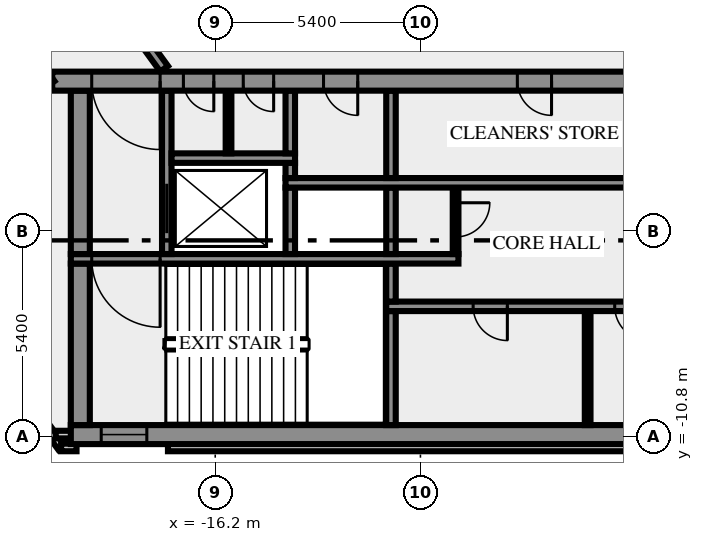
"""IFC4 building model, lengths in metres.
Left out: names, types, materials, properties, quantities, classifications, styles, units other than length and angle.
Written with IfcOpenShell. Run it as: python <this file> out.ifc"""

import sys

from ifc_helpers import new_model, si_unit, direction, frame, frame_2d, origin, place, context, subcontext, project, spatial, rectangle, extrude, element, fill, save


model = new_model("IFC4")
c1 = context("Model", 3, precision=1e-05, world=origin(), true_north=direction((0.0, 1.0)))
c2 = subcontext(c1, "Body", "Model", "MODEL_VIEW")
j1 = project(units=[si_unit("LENGTHUNIT", "METRE"), si_unit("PLANEANGLEUNIT", "RADIAN")], contexts=[c1])
p1 = place(None, origin())
s1 = spatial("IfcSite", under=j1, at=p1, CompositionType="ELEMENT")
p2 = place(p1, origin())
s2 = spatial("IfcBuilding", under=s1, at=p2, CompositionType="ELEMENT")
p3 = place(p2, frame((0.0, 0.0, 168.0)))
s3 = spatial("IfcBuildingStorey", under=s2, at=p3, CompositionType="ELEMENT", Elevation=168.0)
p4 = place(p3, frame((-21.833, -8.909, 0.0), z_axis=(0.0, 0.0, 1.0), x_axis=(0.587766567315, -0.809030569476, 0.0)))
e1 = element("IfcWall", 1, at=p4, inside=s3, PredefinedType="SOLIDWALL", context=c2, shape_type="SweptSolid", body=[
    extrude(rectangle(XDim=2.688, YDim=0.2, at=frame_2d((1.344, 0.0))), origin(), (0.0, 0.0, 1.0), 3.65),
])
p5 = place(p3, frame((-20.256, -11.088, 0.0), z_axis=(0.0, 0.0, 1.0), x_axis=(1.0, 0.0, 0.0)))
e2 = element("IfcWall", 2, at=p5, inside=s3, PredefinedType="SOLIDWALL", context=c2, shape_type="SweptSolid", body=[
    extrude(rectangle(XDim=0.406, YDim=0.2, at=frame_2d((0.203, 0.0))), origin(), (0.0, 0.0, 1.0), 3.65),
])
p6 = place(p3, frame((-17.444, -11.088, 0.0), z_axis=(0.0, 0.0, 1.0), x_axis=(1.0, 0.0, 0.0)))
e3 = element("IfcWall", 3, at=p6, inside=s3, PredefinedType="SOLIDWALL", context=c2, shape_type="SweptSolid", body=[
    extrude(rectangle(XDim=34.888, YDim=0.2, at=frame_2d((17.444, 0.0))), origin(), (0.0, 0.0, 1.0), 3.65),
])
p7 = place(p3, frame((-19.98, -10.75, 0.0), z_axis=(0.0, 0.0, 1.0), x_axis=(-1.0, 0.0, 0.0)))
e4 = element("IfcWall", 4, at=p7, inside=s3, PredefinedType="SOLIDWALL", context=c2, shape_type="SweptSolid", body=[
    extrude(rectangle(XDim=0.417, YDim=0.2, at=frame_2d((0.208, 0.0))), origin(), (0.0, 0.0, 1.0), 3.65),
])
p8 = place(p3, frame((-20.0, -10.75, 0.0), z_axis=(0.0, 0.0, 1.0), x_axis=(1.0, 0.0, 0.0)))
e5 = element("IfcWall", 5, at=p8, inside=s3, PredefinedType="SHEAR", context=c2, shape_type="SweptSolid", body=[
    extrude(rectangle(XDim=40.0, YDim=0.5, at=frame_2d((20.0, 0.0))), origin(), (0.0, 0.0, 1.0), 3.65),
])
p9 = place(p8, frame((0.8, 0.0, 1.0)))
e6 = element("IfcOpeningElement", 6, at=p9, cuts=e5, PredefinedType="OPENING", context=c2, shape_type="SweptSolid", body=[
    extrude(rectangle(XDim=1.2, YDim=1.2, at=frame_2d((0.6, 0.6))), frame((0.0, 0.26, 0.0), z_axis=(0.0, -1.0, 0.0), x_axis=(1.0, 0.0, 0.0)), (0.0, 0.0, 1.0), 0.52),
])
p10 = place(p8, frame((38.0, 0.0, 1.0)))
e7 = element("IfcOpeningElement", 7, at=p10, cuts=e5, PredefinedType="OPENING", context=c2, shape_type="SweptSolid", body=[
    extrude(rectangle(XDim=1.2, YDim=1.2, at=frame_2d((0.6, 0.6))), frame((0.0, 0.26, 0.0), z_axis=(0.0, -1.0, 0.0), x_axis=(1.0, 0.0, 0.0)), (0.0, 0.0, 1.0), 0.52),
])
p11 = place(p3, frame((-19.75, -10.5, 0.0), z_axis=(0.0, 0.0, 1.0), x_axis=(0.0, 1.0, 0.0)))
e8 = element("IfcWall", 8, at=p11, inside=s3, PredefinedType="SHEAR", context=c2, shape_type="SweptSolid", body=[
    extrude(rectangle(XDim=4.25, YDim=0.5, at=frame_2d((2.125, 0.0))), origin(), (0.0, 0.0, 1.0), 3.65),
])
p12 = place(p3, frame((-11.575, -10.5, 0.0), z_axis=(0.0, 0.0, 1.0), x_axis=(0.0, 1.0, 0.0)))
e9 = element("IfcWall", 9, at=p12, inside=s3, PredefinedType="SHEAR", context=c2, shape_type="SweptSolid", body=[
    extrude(rectangle(XDim=3.0, YDim=0.25, at=frame_2d((1.5, 0.0))), origin(), (0.0, 0.0, 1.0), 3.65),
])
p13 = place(p3, frame((-6.4, -10.5, 0.0), z_axis=(0.0, 0.0, 1.0), x_axis=(0.0, 1.0, 0.0)))
e10 = element("IfcWall", 10, at=p13, inside=s3, PredefinedType="PARTITIONING", context=c2, shape_type="SweptSolid", body=[
    extrude(rectangle(XDim=3.0, YDim=0.15, at=frame_2d((1.5, 0.0))), origin(), (0.0, 0.0, 1.0), 3.65),
])
p14 = place(p3, frame((11.7, -7.375, 0.0), z_axis=(0.0, 0.0, 1.0), x_axis=(-1.0, 0.0, 0.0)))
e11 = element("IfcWall", 11, at=p14, inside=s3, PredefinedType="SHEAR", context=c2, shape_type="SweptSolid", body=[
    extrude(rectangle(XDim=23.4, YDim=0.25, at=frame_2d((11.7, 0.0))), origin(), (0.0, 0.0, 1.0), 3.65),
])
p15 = place(p14, frame((20.213, 0.0, 0.0)))
e12 = element("IfcOpeningElement", 12, at=p15, cuts=e11, PredefinedType="OPENING", context=c2, shape_type="SweptSolid", body=[
    extrude(rectangle(XDim=0.9, YDim=2.1, at=frame_2d((0.45, 1.05))), frame((0.0, 0.135, 0.0), z_axis=(0.0, -1.0, 0.0), x_axis=(1.0, 0.0, 0.0)), (0.0, 0.0, 1.0), 0.27),
])
p16 = place(p14, frame((16.488, 0.0, 0.0)))
e13 = element("IfcOpeningElement", 13, at=p16, cuts=e11, PredefinedType="OPENING", context=c2, shape_type="SweptSolid", body=[
    extrude(rectangle(XDim=0.9, YDim=2.1, at=frame_2d((0.45, 1.05))), frame((0.0, 0.135, 0.0), z_axis=(0.0, -1.0, 0.0), x_axis=(1.0, 0.0, 0.0)), (0.0, 0.0, 1.0), 0.27),
])
p17 = place(p14, frame((14.45, 0.0, 0.0)))
e14 = element("IfcOpeningElement", 14, at=p17, cuts=e11, PredefinedType="OPENING", context=c2, shape_type="SweptSolid", body=[
    extrude(rectangle(XDim=0.9, YDim=2.1, at=frame_2d((0.45, 1.05))), frame((0.0, 0.135, 0.0), z_axis=(0.0, -1.0, 0.0), x_axis=(1.0, 0.0, 0.0)), (0.0, 0.0, 1.0), 0.27),
])
p18 = place(p14, frame((12.95, 0.0, 0.0)))
e15 = element("IfcOpeningElement", 15, at=p18, cuts=e11, PredefinedType="OPENING", context=c2, shape_type="SweptSolid", body=[
    extrude(rectangle(XDim=0.9, YDim=2.1, at=frame_2d((0.45, 1.05))), frame((0.0, 0.135, 0.0), z_axis=(0.0, -1.0, 0.0), x_axis=(1.0, 0.0, 0.0)), (0.0, 0.0, 1.0), 0.27),
])
p19 = place(p14, frame((11.475, 0.0, 0.0)))
e16 = element("IfcOpeningElement", 16, at=p19, cuts=e11, PredefinedType="OPENING", context=c2, shape_type="SweptSolid", body=[
    extrude(rectangle(XDim=0.9, YDim=2.1, at=frame_2d((0.45, 1.05))), frame((0.0, 0.135, 0.0), z_axis=(0.0, -1.0, 0.0), x_axis=(1.0, 0.0, 0.0)), (0.0, 0.0, 1.0), 0.27),
])
p20 = place(p14, frame((10.45, 0.0, 0.0)))
e17 = element("IfcOpeningElement", 17, at=p20, cuts=e11, PredefinedType="OPENING", context=c2, shape_type="SweptSolid", body=[
    extrude(rectangle(XDim=0.5, YDim=2.1, at=frame_2d((0.25, 1.05))), frame((0.0, 0.135, 0.0), z_axis=(0.0, -1.0, 0.0), x_axis=(1.0, 0.0, 0.0)), (0.0, 0.0, 1.0), 0.27),
])
p21 = place(p14, frame((8.35, 0.0, 0.0)))
e18 = element("IfcOpeningElement", 18, at=p21, cuts=e11, PredefinedType="OPENING", context=c2, shape_type="SweptSolid", body=[
    extrude(rectangle(XDim=1.1, YDim=2.1, at=frame_2d((0.55, 1.05))), frame((0.0, 0.135, 0.0), z_axis=(0.0, -1.0, 0.0), x_axis=(1.0, 0.0, 0.0)), (0.0, 0.0, 1.0), 0.27),
])
p22 = place(p14, frame((5.85, 0.0, 0.0)))
e19 = element("IfcOpeningElement", 19, at=p22, cuts=e11, PredefinedType="OPENING", context=c2, shape_type="SweptSolid", body=[
    extrude(rectangle(XDim=1.1, YDim=2.1, at=frame_2d((0.55, 1.05))), frame((0.0, 0.135, 0.0), z_axis=(0.0, -1.0, 0.0), x_axis=(1.0, 0.0, 0.0)), (0.0, 0.0, 1.0), 0.27),
])
p23 = place(p14, frame((3.35, 0.0, 0.0)))
e20 = element("IfcOpeningElement", 20, at=p23, cuts=e11, PredefinedType="OPENING", context=c2, shape_type="SweptSolid", body=[
    extrude(rectangle(XDim=1.1, YDim=2.1, at=frame_2d((0.55, 1.05))), frame((0.0, 0.135, 0.0), z_axis=(0.0, -1.0, 0.0), x_axis=(1.0, 0.0, 0.0)), (0.0, 0.0, 1.0), 0.27),
])
p24 = place(p14, frame((0.85, 0.0, 0.0)))
e21 = element("IfcOpeningElement", 21, at=p24, cuts=e11, PredefinedType="OPENING", context=c2, shape_type="SweptSolid", body=[
    extrude(rectangle(XDim=1.1, YDim=2.1, at=frame_2d((0.55, 1.05))), frame((0.0, 0.135, 0.0), z_axis=(0.0, -1.0, 0.0), x_axis=(1.0, 0.0, 0.0)), (0.0, 0.0, 1.0), 0.27),
])
p25 = place(p3, frame((-11.575, -7.25, 0.0), z_axis=(0.0, 0.0, 1.0), x_axis=(0.0, 1.0, 0.0)))
e22 = element("IfcWall", 22, at=p25, inside=s3, PredefinedType="SHEAR", context=c2, shape_type="SweptSolid", body=[
    extrude(rectangle(XDim=1.0, YDim=0.25, at=frame_2d((0.5, 0.0))), origin(), (0.0, 0.0, 1.0), 3.65),
])
p26 = place(p3, frame((-9.8, -6.125, 0.0), z_axis=(0.0, 0.0, 1.0), x_axis=(-1.0, 0.0, 0.0)))
e23 = element("IfcWall", 23, at=p26, inside=s3, PredefinedType="SHEAR", context=c2, shape_type="SweptSolid", body=[
    extrude(rectangle(XDim=10.2, YDim=0.25, at=frame_2d((5.1, 0.0))), origin(), (0.0, 0.0, 1.0), 3.65),
])
p27 = place(p26, frame((7.85, 0.0, 0.0)))
e24 = element("IfcOpeningElement", 24, at=p27, cuts=e23, PredefinedType="OPENING", context=c2, shape_type="SweptSolid", body=[
    extrude(rectangle(XDim=1.8, YDim=2.1, at=frame_2d((0.9, 1.05))), frame((0.0, 0.135, 0.0), z_axis=(0.0, -1.0, 0.0), x_axis=(1.0, 0.0, 0.0)), (0.0, 0.0, 1.0), 0.27),
])
p28 = place(p3, frame((-19.75, -6.0, 0.0), z_axis=(0.0, 0.0, 1.0), x_axis=(0.0, 1.0, 0.0)))
e25 = element("IfcWall", 25, at=p28, inside=s3, PredefinedType="SHEAR", context=c2, shape_type="SweptSolid", body=[
    extrude(rectangle(XDim=4.3, YDim=0.5, at=frame_2d((2.15, 0.0))), origin(), (0.0, 0.0, 1.0), 3.65),
])
p29 = place(p3, frame((-17.475, -6.0, 0.0), z_axis=(0.0, 0.0, 1.0), x_axis=(0.0, 1.0, 0.0)))
e26 = element("IfcWall", 26, at=p29, inside=s3, PredefinedType="SHEAR", context=c2, shape_type="SweptSolid", body=[
    extrude(rectangle(XDim=4.3, YDim=0.25, at=frame_2d((2.15, 0.0))), origin(), (0.0, 0.0, 1.0), 3.65),
])
p30 = place(p29, frame((0.55, 0.0, 0.0)))
e27 = element("IfcOpeningElement", 27, at=p30, cuts=e26, PredefinedType="OPENING", context=c2, shape_type="SweptSolid", body=[
    extrude(rectangle(XDim=1.3, YDim=2.1, at=frame_2d((0.65, 1.05))), frame((0.0, 0.135, 0.0), z_axis=(0.0, -1.0, 0.0), x_axis=(1.0, 0.0, 0.0)), (0.0, 0.0, 1.0), 0.27),
])
for number, where, z_axis, x_axis in (
    (28, (-14.225, -6.0, 0.0), (0.0, 0.0, 1.0), (0.0, 1.0, 0.0)),
    (29, (-11.575, -6.0, 0.0), (0.0, 0.0, 1.0), (0.0, 1.0, 0.0)),
):
    element("IfcWall", number, at=place(p3, frame(where, z_axis=z_axis, x_axis=x_axis)), inside=s3, PredefinedType="SHEAR", context=c2, shape_type="SweptSolid", body=[
        extrude(rectangle(XDim=1.75, YDim=0.25, at=frame_2d((0.875, 0.0))), origin(), (0.0, 0.0, 1.0), 3.65),
    ])
p31 = place(p3, frame((-9.875, -4.25, 0.0), z_axis=(0.0, 0.0, 1.0), x_axis=(0.0, -1.0, 0.0)))
e30 = element("IfcWall", 30, at=p31, inside=s3, PredefinedType="PARTITIONING", context=c2, shape_type="SweptSolid", body=[
    extrude(rectangle(XDim=1.75, YDim=0.15, at=frame_2d((0.875, 0.0))), origin(), (0.0, 0.0, 1.0), 3.65),
])
p32 = place(p31, frame((0.4, 0.0, 0.0)))
e31 = element("IfcOpeningElement", 31, at=p32, cuts=e30, PredefinedType="OPENING", context=c2, shape_type="SweptSolid", body=[
    extrude(rectangle(XDim=0.9, YDim=2.1, at=frame_2d((0.45, 1.05))), frame((0.0, 0.085, 0.0), z_axis=(0.0, -1.0, 0.0), x_axis=(1.0, 0.0, 0.0)), (0.0, 0.0, 1.0), 0.17),
])
p33 = place(p3, frame((-14.35, -4.125, 0.0), z_axis=(0.0, 0.0, 1.0), x_axis=(1.0, 0.0, 0.0)))
e32 = element("IfcWall", 32, at=p33, inside=s3, PredefinedType="SHEAR", context=c2, shape_type="SweptSolid", body=[
    extrude(rectangle(XDim=10.4, YDim=0.25, at=frame_2d((5.2, 0.0))), origin(), (0.0, 0.0, 1.0), 3.65),
])
p34 = place(p3, frame((-14.225, -4.0, 0.0), z_axis=(0.0, 0.0, 1.0), x_axis=(0.0, 1.0, 0.0)))
e33 = element("IfcWall", 33, at=p34, inside=s3, PredefinedType="SHEAR", context=c2, shape_type="SweptSolid", body=[
    extrude(rectangle(XDim=0.4, YDim=0.25, at=frame_2d((0.2, 0.0))), origin(), (0.0, 0.0, 1.0), 3.65),
])
p35 = place(p3, frame((-11.575, -4.0, 0.0), z_axis=(0.0, 0.0, 1.0), x_axis=(0.0, 1.0, 0.0)))
e34 = element("IfcWall", 34, at=p35, inside=s3, PredefinedType="SHEAR", context=c2, shape_type="SweptSolid", body=[
    extrude(rectangle(XDim=2.3, YDim=0.25, at=frame_2d((1.15, 0.0))), origin(), (0.0, 0.0, 1.0), 3.65),
])
p36 = place(p3, frame((-17.35, -3.475, 0.0), z_axis=(0.0, 0.0, 1.0), x_axis=(1.0, 0.0, 0.0)))
e35 = element("IfcWall", 35, at=p36, inside=s3, PredefinedType="SHEAR", context=c2, shape_type="SweptSolid", body=[
    extrude(rectangle(XDim=3.25, YDim=0.25, at=frame_2d((1.625, 0.0))), origin(), (0.0, 0.0, 1.0), 3.65),
])
p37 = place(p3, frame((-15.85, -3.35, 0.0), z_axis=(0.0, 0.0, 1.0), x_axis=(0.0, 1.0, 0.0)))
e36 = element("IfcWall", 36, at=p37, inside=s3, PredefinedType="PARTITIONING", context=c2, shape_type="SweptSolid", body=[
    extrude(rectangle(XDim=1.65, YDim=0.15, at=frame_2d((0.825, 0.0))), origin(), (0.0, 0.0, 1.0), 3.65),
])
p38 = place(p3, frame((-14.225, -3.35, 0.0), z_axis=(0.0, 0.0, 1.0), x_axis=(0.0, 1.0, 0.0)))
e37 = element("IfcWall", 37, at=p38, inside=s3, PredefinedType="SHEAR", context=c2, shape_type="SweptSolid", body=[
    extrude(rectangle(XDim=1.65, YDim=0.25, at=frame_2d((0.825, 0.0))), origin(), (0.0, 0.0, 1.0), 3.65),
])
p39 = place(p3, frame((20.49, -1.45, 0.0), z_axis=(0.0, 0.0, 1.0), x_axis=(-1.0, 0.0, 0.0)))
e38 = element("IfcWall", 38, at=p39, inside=s3, PredefinedType="SHEAR", context=c2, shape_type="SweptSolid", body=[
    extrude(rectangle(XDim=40.98, YDim=0.5, at=frame_2d((20.49, 0.0))), origin(), (0.0, 0.0, 1.0), 3.65),
])
p40 = place(p39, frame((38.14, 0.0, 0.0)))
e39 = element("IfcOpeningElement", 39, at=p40, cuts=e38, PredefinedType="OPENING", context=c2, shape_type="SweptSolid", body=[
    extrude(rectangle(XDim=1.8, YDim=2.1, at=frame_2d((0.9, 1.05))), frame((0.0, 0.26, 0.0), z_axis=(0.0, -1.0, 0.0), x_axis=(1.0, 0.0, 0.0)), (0.0, 0.0, 1.0), 0.52),
])
p41 = place(p39, frame((36.728, 0.0, 0.0)))
e40 = element("IfcOpeningElement", 40, at=p41, cuts=e38, PredefinedType="OPENING", context=c2, shape_type="SweptSolid", body=[
    extrude(rectangle(XDim=0.8, YDim=2.1, at=frame_2d((0.4, 1.05))), frame((0.0, 0.26, 0.0), z_axis=(0.0, -1.0, 0.0), x_axis=(1.0, 0.0, 0.0)), (0.0, 0.0, 1.0), 0.52),
])
p42 = place(p39, frame((35.153, 0.0, 0.0)))
e41 = element("IfcOpeningElement", 41, at=p42, cuts=e38, PredefinedType="OPENING", context=c2, shape_type="SweptSolid", body=[
    extrude(rectangle(XDim=0.8, YDim=2.1, at=frame_2d((0.4, 1.05))), frame((0.0, 0.26, 0.0), z_axis=(0.0, -1.0, 0.0), x_axis=(1.0, 0.0, 0.0)), (0.0, 0.0, 1.0), 0.52),
])
p43 = place(p39, frame((32.94, 0.0, 0.0)))
e42 = element("IfcOpeningElement", 42, at=p43, cuts=e38, PredefinedType="OPENING", context=c2, shape_type="SweptSolid", body=[
    extrude(rectangle(XDim=0.9, YDim=2.1, at=frame_2d((0.45, 1.05))), frame((0.0, 0.26, 0.0), z_axis=(0.0, -1.0, 0.0), x_axis=(1.0, 0.0, 0.0)), (0.0, 0.0, 1.0), 0.52),
])
p44 = place(p39, frame((27.84, 0.0, 0.0)))
e43 = element("IfcOpeningElement", 43, at=p44, cuts=e38, PredefinedType="OPENING", context=c2, shape_type="SweptSolid", body=[
    extrude(rectangle(XDim=0.9, YDim=2.1, at=frame_2d((0.45, 1.05))), frame((0.0, 0.26, 0.0), z_axis=(0.0, -1.0, 0.0), x_axis=(1.0, 0.0, 0.0)), (0.0, 0.0, 1.0), 0.52),
])
p45 = place(p39, frame((21.765, 0.0, 0.0)))
e44 = element("IfcOpeningElement", 44, at=p45, cuts=e38, PredefinedType="OPENING", context=c2, shape_type="SweptSolid", body=[
    extrude(rectangle(XDim=2.0, YDim=2.1, at=frame_2d((1.0, 1.05))), frame((0.0, 0.26, 0.0), z_axis=(0.0, -1.0, 0.0), x_axis=(1.0, 0.0, 0.0)), (0.0, 0.0, 1.0), 0.52),
])
p46 = place(p39, frame((7.14, 0.0, 0.0)))
e45 = element("IfcOpeningElement", 45, at=p46, cuts=e38, PredefinedType="OPENING", context=c2, shape_type="SweptSolid", body=[
    extrude(rectangle(XDim=0.9, YDim=2.1, at=frame_2d((0.45, 1.05))), frame((0.0, 0.26, 0.0), z_axis=(0.0, -1.0, 0.0), x_axis=(1.0, 0.0, 0.0)), (0.0, 0.0, 1.0), 0.52),
])
p47 = place(p39, frame((4.19, 0.0, 0.0)))
e46 = element("IfcOpeningElement", 46, at=p47, cuts=e38, PredefinedType="OPENING", context=c2, shape_type="SweptSolid", body=[
    extrude(rectangle(XDim=0.9, YDim=2.1, at=frame_2d((0.45, 1.05))), frame((0.0, 0.26, 0.0), z_axis=(0.0, -1.0, 0.0), x_axis=(1.0, 0.0, 0.0)), (0.0, 0.0, 1.0), 0.52),
])
p48 = place(p39, frame((1.04, 0.0, 0.0)))
e47 = element("IfcOpeningElement", 47, at=p48, cuts=e38, PredefinedType="OPENING", context=c2, shape_type="SweptSolid", body=[
    extrude(rectangle(XDim=1.8, YDim=2.1, at=frame_2d((0.9, 1.05))), frame((0.0, 0.26, 0.0), z_axis=(0.0, -1.0, 0.0), x_axis=(1.0, 0.0, 0.0)), (0.0, 0.0, 1.0), 0.52),
])
p49 = place(p3, frame((-20.531, -1.523, 0.0), z_axis=(0.0, 0.0, 1.0), x_axis=(-0.587784239999, 0.809017729849, 0.0)))
e48 = element("IfcWall", 48, at=p49, inside=s3, PredefinedType="SOLIDWALL", context=c2, shape_type="SweptSolid", body=[
    extrude(rectangle(XDim=23.271, YDim=0.25, at=frame_2d((11.635, 0.0))), origin(), (0.0, 0.0, 1.0), 3.65),
])
p50 = place(p49, frame((18.366, 0.0, 0.0)))
e49 = element("IfcOpeningElement", 49, at=p50, cuts=e48, PredefinedType="OPENING", context=c2, shape_type="SweptSolid", body=[
    extrude(rectangle(XDim=0.9, YDim=2.1, at=frame_2d((0.45, 1.05))), frame((0.0, 0.135, 0.0), z_axis=(0.0, -1.0, 0.0), x_axis=(1.0, 0.0, 0.0)), (0.0, 0.0, 1.0), 0.27),
])
p51 = place(p49, frame((10.266, 0.0, 0.0)))
e50 = element("IfcOpeningElement", 50, at=p51, cuts=e48, PredefinedType="OPENING", context=c2, shape_type="SweptSolid", body=[
    extrude(rectangle(XDim=0.9, YDim=2.1, at=frame_2d((0.45, 1.05))), frame((0.0, 0.135, 0.0), z_axis=(0.0, -1.0, 0.0), x_axis=(1.0, 0.0, 0.0)), (0.0, 0.0, 1.0), 0.27),
])
p52 = place(p49, frame((21.896, 0.0, 0.0)))
e51 = element("IfcOpeningElement", 51, at=p52, cuts=e48, PredefinedType="OPENING", context=c2, shape_type="SweptSolid", body=[
    extrude(rectangle(XDim=0.9, YDim=2.1, at=frame_2d((0.45, 1.05))), frame((0.0, 0.135, 0.0), z_axis=(0.0, -1.0, 0.0), x_axis=(1.0, 0.0, 0.0)), (0.0, 0.0, 1.0), 0.27),
])
p53 = place(p49, frame((12.966, 0.0, 0.0)))
e52 = element("IfcOpeningElement", 52, at=p53, cuts=e48, PredefinedType="OPENING", context=c2, shape_type="SweptSolid", body=[
    extrude(rectangle(XDim=0.9, YDim=2.1, at=frame_2d((0.45, 1.05))), frame((0.0, 0.135, 0.0), z_axis=(0.0, -1.0, 0.0), x_axis=(1.0, 0.0, 0.0)), (0.0, 0.0, 1.0), 0.27),
])
p54 = place(p3, frame((-31.918, 18.658, 0.0), z_axis=(0.0, 0.0, 1.0), x_axis=(0.587788731405, -0.80901446664, 0.0)))
e53 = element("IfcWall", 53, at=p54, inside=s3, PredefinedType="SOLIDWALL", context=c2, shape_type="SweptSolid", body=[
    extrude(rectangle(XDim=24.453, YDim=0.25, at=frame_2d((12.227, 0.0))), origin(), (0.0, 0.0, 1.0), 3.65),
])
p55 = place(p54, frame((0.224, 0.0, 0.0)))
e54 = element("IfcOpeningElement", 54, at=p55, cuts=e53, PredefinedType="OPENING", context=c2, shape_type="SweptSolid", body=[
    extrude(rectangle(XDim=0.9, YDim=2.1, at=frame_2d((0.45, 1.05))), frame((0.0, 0.135, 0.0), z_axis=(0.0, -1.0, 0.0), x_axis=(1.0, 0.0, 0.0)), (0.0, 0.0, 1.0), 0.27),
])
p56 = place(p9, origin())
e55 = element("IfcWindow", 55, at=p56, inside=s3, PartitioningType="SINGLE_PANEL", PredefinedType="WINDOW", context=c2, shape_type="SweptSolid", body=[
    extrude(rectangle(XDim=1.2, YDim=1.2, at=frame_2d((0.6, 0.6))), frame((0.0, 0.03, 0.0), z_axis=(0.0, -1.0, 0.0), x_axis=(1.0, 0.0, 0.0)), (0.0, 0.0, 1.0), 0.06),
])
fill(e6, e55)
p57 = place(p15, origin())
e56 = element("IfcDoor", 56, at=p57, inside=s3, OperationType="SINGLE_SWING_RIGHT", PredefinedType="DOOR", context=c2, shape_type="SweptSolid", body=[
    extrude(rectangle(XDim=0.9, YDim=2.1, at=frame_2d((0.45, 1.05))), frame((0.0, 0.025, 0.0), z_axis=(0.0, -1.0, 0.0), x_axis=(1.0, 0.0, 0.0)), (0.0, 0.0, 1.0), 0.05),
])
fill(e12, e56)
p58 = place(p16, origin())
e57 = element("IfcDoor", 57, at=p58, inside=s3, OperationType="SINGLE_SWING_RIGHT", PredefinedType="DOOR", context=c2, shape_type="SweptSolid", body=[
    extrude(rectangle(XDim=0.9, YDim=2.1, at=frame_2d((0.45, 1.05))), frame((0.0, 0.025, 0.0), z_axis=(0.0, -1.0, 0.0), x_axis=(1.0, 0.0, 0.0)), (0.0, 0.0, 1.0), 0.05),
])
fill(e13, e57)
p59 = place(p27, origin())
e58 = element("IfcDoor", 58, at=p59, inside=s3, OperationType="DOUBLE_DOOR_SINGLE_SWING", PredefinedType="DOOR", context=c2, shape_type="SweptSolid", body=[
    extrude(rectangle(XDim=1.8, YDim=2.1, at=frame_2d((0.9, 1.05))), frame((0.0, 0.025, 0.0), z_axis=(0.0, -1.0, 0.0), x_axis=(1.0, 0.0, 0.0)), (0.0, 0.0, 1.0), 0.05),
])
fill(e24, e58)
p60 = place(p30, origin())
e59 = element("IfcDoor", 59, at=p60, inside=s3, OperationType="DOUBLE_DOOR_SLIDING", PredefinedType="DOOR", context=c2, shape_type="SweptSolid", body=[
    extrude(rectangle(XDim=1.3, YDim=2.1, at=frame_2d((0.65, 1.05))), frame((0.0, 0.025, 0.0), z_axis=(0.0, -1.0, 0.0), x_axis=(1.0, 0.0, 0.0)), (0.0, 0.0, 1.0), 0.05),
])
fill(e27, e59)
p61 = place(p32, origin())
e60 = element("IfcDoor", 60, at=p61, inside=s3, OperationType="SINGLE_SWING_LEFT", PredefinedType="DOOR", context=c2, shape_type="SweptSolid", body=[
    extrude(rectangle(XDim=0.9, YDim=2.1, at=frame_2d((0.45, 1.05))), frame((0.0, 0.025, 0.0), z_axis=(0.0, -1.0, 0.0), x_axis=(1.0, 0.0, 0.0)), (0.0, 0.0, 1.0), 0.05),
])
fill(e31, e60)
p62 = place(p40, origin())
e61 = element("IfcDoor", 61, at=p62, inside=s3, OperationType="DOUBLE_DOOR_SINGLE_SWING", PredefinedType="DOOR", context=c2, shape_type="SweptSolid", body=[
    extrude(rectangle(XDim=1.8, YDim=2.1, at=frame_2d((0.9, 1.05))), frame((0.0, 0.025, 0.0), z_axis=(0.0, -1.0, 0.0), x_axis=(1.0, 0.0, 0.0)), (0.0, 0.0, 1.0), 0.05),
])
fill(e39, e61)
p63 = place(p41, origin())
e62 = element("IfcDoor", 62, at=p63, inside=s3, OperationType="SINGLE_SWING_RIGHT", PredefinedType="DOOR", context=c2, shape_type="SweptSolid", body=[
    extrude(rectangle(XDim=0.8, YDim=2.1, at=frame_2d((0.4, 1.05))), frame((0.0, 0.025, 0.0), z_axis=(0.0, -1.0, 0.0), x_axis=(1.0, 0.0, 0.0)), (0.0, 0.0, 1.0), 0.05),
])
fill(e40, e62)
p64 = place(p42, origin())
e63 = element("IfcDoor", 63, at=p64, inside=s3, OperationType="SINGLE_SWING_RIGHT", PredefinedType="DOOR", context=c2, shape_type="SweptSolid", body=[
    extrude(rectangle(XDim=0.8, YDim=2.1, at=frame_2d((0.4, 1.05))), frame((0.0, 0.025, 0.0), z_axis=(0.0, -1.0, 0.0), x_axis=(1.0, 0.0, 0.0)), (0.0, 0.0, 1.0), 0.05),
])
fill(e41, e63)
p65 = place(p43, origin())
e64 = element("IfcDoor", 64, at=p65, inside=s3, OperationType="SINGLE_SWING_RIGHT", PredefinedType="DOOR", context=c2, shape_type="SweptSolid", body=[
    extrude(rectangle(XDim=0.9, YDim=2.1, at=frame_2d((0.45, 1.05))), frame((0.0, 0.025, 0.0), z_axis=(0.0, -1.0, 0.0), x_axis=(1.0, 0.0, 0.0)), (0.0, 0.0, 1.0), 0.05),
])
fill(e42, e64)
p66 = place(p44, origin())
e65 = element("IfcDoor", 65, at=p66, inside=s3, OperationType="SINGLE_SWING_RIGHT", PredefinedType="DOOR", context=c2, shape_type="SweptSolid", body=[
    extrude(rectangle(XDim=0.9, YDim=2.1, at=frame_2d((0.45, 1.05))), frame((0.0, 0.025, 0.0), z_axis=(0.0, -1.0, 0.0), x_axis=(1.0, 0.0, 0.0)), (0.0, 0.0, 1.0), 0.05),
])
fill(e43, e65)
save(model, sys.argv[1])
